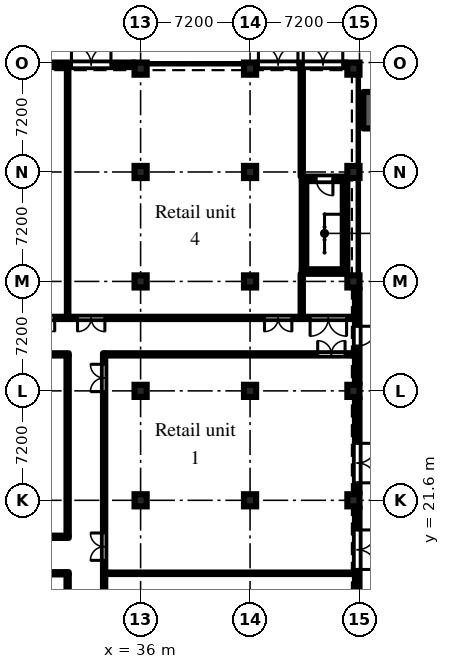
"""IFC4 building model, lengths in metres.
Left out: names, types, materials, properties, quantities, classifications, styles, units other than length and angle.
Written with IfcOpenShell. Run it as: python <this file> out.ifc"""

import sys

from ifc_helpers import new_model, si_unit, direction, frame, frame_2d, origin, origin_2d, place, context, subcontext, project, spatial, rectangle, extrude, element, fill, save


model = new_model("IFC4")
c1 = context("Model", 3, precision=1e-05, world=origin(), true_north=direction((0.0, 1.0)))
c2 = subcontext(c1, "Body", "Model", "MODEL_VIEW")
j1 = project(units=[si_unit("LENGTHUNIT", "METRE"), si_unit("PLANEANGLEUNIT", "RADIAN")], contexts=[c1])
p1 = place(None, origin())
s1 = spatial("IfcSite", under=j1, at=p1, CompositionType="ELEMENT")
p2 = place(p1, origin())
s2 = spatial("IfcBuilding", under=s1, at=p2, CompositionType="ELEMENT")
p3 = place(p2, origin())
s3 = spatial("IfcBuildingStorey", under=s2, at=p3, CompositionType="ELEMENT", Elevation=0.0)
for number, where, z_axis, x_axis in (
    (1, (36.0, 21.6, 0.0), (0.0, 0.0, 1.0), (1.0, 0.0, 0.0)),
    (2, (36.0, 28.8, 0.0), (0.0, 0.0, 1.0), (1.0, 0.0, 0.0)),
    (3, (36.0, 36.0, 0.0), (0.0, 0.0, 1.0), (1.0, 0.0, 0.0)),
    (4, (36.0, 43.2, 0.0), (0.0, 0.0, 1.0), (1.0, 0.0, 0.0)),
    (5, (36.0, 50.0, 0.0), (0.0, 0.0, 1.0), (1.0, 0.0, 0.0)),
    (6, (43.2, 21.6, 0.0), (0.0, 0.0, 1.0), (1.0, 0.0, 0.0)),
    (7, (43.2, 28.8, 0.0), (0.0, 0.0, 1.0), (1.0, 0.0, 0.0)),
    (8, (43.2, 36.0, 0.0), (0.0, 0.0, 1.0), (1.0, 0.0, 0.0)),
    (9, (43.2, 43.2, 0.0), (0.0, 0.0, 1.0), (1.0, 0.0, 0.0)),
    (10, (43.2, 50.0, 0.0), (0.0, 0.0, 1.0), (1.0, 0.0, 0.0)),
    (11, (50.0, 21.6, 0.0), (0.0, 0.0, 1.0), (1.0, 0.0, 0.0)),
    (12, (50.0, 28.8, 0.0), (0.0, 0.0, 1.0), (1.0, 0.0, 0.0)),
    (13, (50.0, 36.0, 0.0), (0.0, 0.0, 1.0), (1.0, 0.0, 0.0)),
    (14, (50.0, 43.2, 0.0), (0.0, 0.0, 1.0), (1.0, 0.0, 0.0)),
    (15, (50.0, 50.0, 0.0), (0.0, 0.0, 1.0), (1.0, 0.0, 0.0)),
):
    element("IfcColumn", number, at=place(p3, frame(where, z_axis=z_axis, x_axis=x_axis)), inside=s3, PredefinedType="COLUMN", context=c2, shape_type="SweptSolid", body=[
        extrude(rectangle(XDim=0.8, YDim=0.8, at=origin_2d()), origin(), (0.0, 0.0, 1.0), 6.6),
    ])
p4 = place(p3, frame((50.25, 14.8, 0.0), z_axis=(0.0, 0.0, 1.0), x_axis=(0.0, 1.0, 0.0)))
e16 = element("IfcWall", 16, at=p4, inside=s3, PredefinedType="SOLIDWALL", context=c2, shape_type="SweptSolid", body=[
    extrude(rectangle(XDim=6.4, YDim=0.3, at=frame_2d((3.2, 0.0))), origin(), (0.0, 0.0, 1.0), 6.6),
])
p5 = place(p4, frame((2.25, 0.0, 0.0)))
e17 = element("IfcOpeningElement", 17, at=p5, cuts=e16, PredefinedType="OPENING", context=c2, shape_type="SweptSolid", body=[
    extrude(rectangle(XDim=2.6, YDim=2.4, at=frame_2d((1.3, 1.2))), frame((0.0, 0.16, 0.0), z_axis=(0.0, -1.0, 0.0), x_axis=(1.0, 0.0, 0.0)), (0.0, 0.0, 1.0), 0.32),
])
p6 = place(p3, frame((50.25, 22.0, 0.0), z_axis=(0.0, 0.0, 1.0), x_axis=(0.0, 1.0, 0.0)))
e18 = element("IfcWall", 18, at=p6, inside=s3, PredefinedType="SOLIDWALL", context=c2, shape_type="SweptSolid", body=[
    extrude(rectangle(XDim=6.4, YDim=0.3, at=frame_2d((3.2, 0.0))), origin(), (0.0, 0.0, 1.0), 6.6),
])
p7 = place(p6, frame((0.75, 0.0, 0.0)))
e19 = element("IfcOpeningElement", 19, at=p7, cuts=e18, PredefinedType="OPENING", context=c2, shape_type="SweptSolid", body=[
    extrude(rectangle(XDim=2.6, YDim=2.4, at=frame_2d((1.3, 1.2))), frame((0.0, 0.16, 0.0), z_axis=(0.0, -1.0, 0.0), x_axis=(1.0, 0.0, 0.0)), (0.0, 0.0, 1.0), 0.32),
])
p8 = place(p3, frame((50.25, 29.2, 0.0), z_axis=(0.0, 0.0, 1.0), x_axis=(0.0, 1.0, 0.0)))
e20 = element("IfcWall", 20, at=p8, inside=s3, PredefinedType="SOLIDWALL", context=c2, shape_type="SweptSolid", body=[
    extrude(rectangle(XDim=6.4, YDim=0.3, at=frame_2d((3.2, 0.0))), origin(), (0.0, 0.0, 1.0), 6.6),
])
p9 = place(p8, frame((2.55, 0.0, 0.0)))
e21 = element("IfcOpeningElement", 21, at=p9, cuts=e20, PredefinedType="OPENING", context=c2, shape_type="SweptSolid", body=[
    extrude(rectangle(XDim=1.3, YDim=2.1, at=frame_2d((0.65, 1.05))), frame((0.0, 0.16, 0.0), z_axis=(0.0, -1.0, 0.0), x_axis=(1.0, 0.0, 0.0)), (0.0, 0.0, 1.0), 0.32),
])
p10 = place(p3, frame((49.6, 50.25, 0.0), z_axis=(0.0, 0.0, 1.0), x_axis=(-1.0, 0.0, 0.0)))
e22 = element("IfcWall", 22, at=p10, inside=s3, PredefinedType="SOLIDWALL", context=c2, shape_type="SweptSolid", body=[
    extrude(rectangle(XDim=6.0, YDim=0.3, at=frame_2d((3.0, 0.0))), origin(), (0.0, 0.0, 1.0), 6.6),
])
p11 = place(p10, frame((0.3, 0.0, 0.0)))
e23 = element("IfcOpeningElement", 23, at=p11, cuts=e22, PredefinedType="OPENING", context=c2, shape_type="SweptSolid", body=[
    extrude(rectangle(XDim=2.6, YDim=2.4, at=frame_2d((1.3, 1.2))), frame((0.0, 0.16, 0.0), z_axis=(0.0, -1.0, 0.0), x_axis=(1.0, 0.0, 0.0)), (0.0, 0.0, 1.0), 0.32),
])
p12 = place(p10, frame((3.25, 0.0, 0.0)))
e24 = element("IfcOpeningElement", 24, at=p12, cuts=e22, PredefinedType="OPENING", context=c2, shape_type="SweptSolid", body=[
    extrude(rectangle(XDim=2.6, YDim=2.4, at=frame_2d((1.3, 1.2))), frame((0.0, 0.16, 0.0), z_axis=(0.0, -1.0, 0.0), x_axis=(1.0, 0.0, 0.0)), (0.0, 0.0, 1.0), 0.32),
])
p13 = place(p3, frame((35.6, 50.25, 0.0), z_axis=(0.0, 0.0, 1.0), x_axis=(-1.0, 0.0, 0.0)))
e25 = element("IfcWall", 25, at=p13, inside=s3, PredefinedType="SOLIDWALL", context=c2, shape_type="SweptSolid", body=[
    extrude(rectangle(XDim=6.4, YDim=0.3, at=frame_2d((3.2, 0.0))), origin(), (0.0, 0.0, 1.0), 6.6),
])
p14 = place(p13, frame((1.55, 0.0, 0.0)))
e26 = element("IfcOpeningElement", 26, at=p14, cuts=e25, PredefinedType="OPENING", context=c2, shape_type="SweptSolid", body=[
    extrude(rectangle(XDim=2.6, YDim=2.4, at=frame_2d((1.3, 1.2))), frame((0.0, 0.16, 0.0), z_axis=(0.0, -1.0, 0.0), x_axis=(1.0, 0.0, 0.0)), (0.0, 0.0, 1.0), 0.32),
])
p15 = place(p3, frame((51.05, 46.064, 0.0), z_axis=(0.0, 0.0, 1.0), x_axis=(0.0, 1.0, 0.0)))
e27 = element("IfcWall", 27, at=p15, inside=s3, PredefinedType="SOLIDWALL", context=c2, shape_type="SweptSolid", body=[
    extrude(rectangle(XDim=2.4, YDim=0.8, at=frame_2d((1.2, 0.0))), origin(), (0.0, 0.0, 1.0), 6.6),
])
p16 = place(p3, frame((46.6, 36.65, 0.0), z_axis=(0.0, 0.0, 1.0), x_axis=(1.0, 0.0, 0.0)))
e28 = element("IfcWall", 28, at=p16, inside=s3, PredefinedType="SHEAR", context=c2, shape_type="SweptSolid", body=[
    extrude(rectangle(XDim=3.0, YDim=0.3, at=frame_2d((1.5, 0.0))), origin(), (0.0, 0.0, 1.0), 6.6),
])
p17 = place(p3, frame((46.6, 42.75, 0.0), z_axis=(0.0, 0.0, 1.0), x_axis=(1.0, 0.0, 0.0)))
e29 = element("IfcWall", 29, at=p17, inside=s3, PredefinedType="SHEAR", context=c2, shape_type="SweptSolid", body=[
    extrude(rectangle(XDim=3.0, YDim=0.3, at=frame_2d((1.5, 0.0))), origin(), (0.0, 0.0, 1.0), 6.6),
])
p18 = place(p17, frame((0.95, 0.0, 0.0)))
e30 = element("IfcOpeningElement", 30, at=p18, cuts=e29, PredefinedType="OPENING", context=c2, shape_type="SweptSolid", body=[
    extrude(rectangle(XDim=1.1, YDim=2.1, at=frame_2d((0.55, 1.05))), frame((0.0, 0.16, 0.0), z_axis=(0.0, -1.0, 0.0), x_axis=(1.0, 0.0, 0.0)), (0.0, 0.0, 1.0), 0.32),
])
for number, where, z_axis, x_axis in (
    (31, (46.75, 36.8, 0.0), (0.0, 0.0, 1.0), (0.0, 1.0, 0.0)),
    (32, (49.45, 36.8, 0.0), (0.0, 0.0, 1.0), (0.0, 1.0, 0.0)),
):
    element("IfcWall", number, at=place(p3, frame(where, z_axis=z_axis, x_axis=x_axis)), inside=s3, PredefinedType="SHEAR", context=c2, shape_type="SweptSolid", body=[
        extrude(rectangle(XDim=5.8, YDim=0.3, at=frame_2d((2.9, 0.0))), origin(), (0.0, 0.0, 1.0), 6.6),
    ])
p19 = place(p3, frame((18.675, 16.8, 0.0), z_axis=(0.0, 0.0, 1.0), x_axis=(1.0, 0.0, 0.0)))
e33 = element("IfcWall", 33, at=p19, inside=s3, PredefinedType="PARTITIONING", context=c2, shape_type="SweptSolid", body=[
    extrude(rectangle(XDim=12.6, YDim=0.15, at=frame_2d((6.3, 0.0))), origin(), (0.0, 0.0, 1.0), 6.6),
])
p20 = place(p3, frame((18.675, 19.2, 0.0), z_axis=(0.0, 0.0, 1.0), x_axis=(1.0, 0.0, 0.0)))
e34 = element("IfcWall", 34, at=p20, inside=s3, PredefinedType="PARTITIONING", context=c2, shape_type="SweptSolid", body=[
    extrude(rectangle(XDim=12.6, YDim=0.15, at=frame_2d((6.3, 0.0))), origin(), (0.0, 0.0, 1.0), 6.6),
])
p21 = place(p20, frame((1.175, 0.0, 0.0)))
e35 = element("IfcOpeningElement", 35, at=p21, cuts=e34, PredefinedType="OPENING", context=c2, shape_type="SweptSolid", body=[
    extrude(rectangle(XDim=1.2, YDim=2.1, at=frame_2d((0.6, 1.05))), frame((0.0, 0.085, 0.0), z_axis=(0.0, -1.0, 0.0), x_axis=(1.0, 0.0, 0.0)), (0.0, 0.0, 1.0), 0.17),
])
p22 = place(p20, frame((9.78, 0.0, 0.0)))
e36 = element("IfcOpeningElement", 36, at=p22, cuts=e34, PredefinedType="OPENING", context=c2, shape_type="SweptSolid", body=[
    extrude(rectangle(XDim=1.2, YDim=2.1, at=frame_2d((0.6, 1.05))), frame((0.0, 0.085, 0.0), z_axis=(0.0, -1.0, 0.0), x_axis=(1.0, 0.0, 0.0)), (0.0, 0.0, 1.0), 0.17),
])
p23 = place(p3, frame((18.675, 31.2, 0.0), z_axis=(0.0, 0.0, 1.0), x_axis=(1.0, 0.0, 0.0)))
e37 = element("IfcWall", 37, at=p23, inside=s3, PredefinedType="PARTITIONING", context=c2, shape_type="SweptSolid", body=[
    extrude(rectangle(XDim=12.6, YDim=0.15, at=frame_2d((6.3, 0.0))), origin(), (0.0, 0.0, 1.0), 6.6),
])
p24 = place(p23, frame((3.68, 0.0, 0.0)))
e38 = element("IfcOpeningElement", 38, at=p24, cuts=e37, PredefinedType="OPENING", context=c2, shape_type="SweptSolid", body=[
    extrude(rectangle(XDim=1.2, YDim=2.1, at=frame_2d((0.6, 1.05))), frame((0.0, 0.085, 0.0), z_axis=(0.0, -1.0, 0.0), x_axis=(1.0, 0.0, 0.0)), (0.0, 0.0, 1.0), 0.17),
])
p25 = place(p23, frame((7.675, 0.0, 0.0)))
e39 = element("IfcOpeningElement", 39, at=p25, cuts=e37, PredefinedType="OPENING", context=c2, shape_type="SweptSolid", body=[
    extrude(rectangle(XDim=1.2, YDim=2.1, at=frame_2d((0.6, 1.05))), frame((0.0, 0.085, 0.0), z_axis=(0.0, -1.0, 0.0), x_axis=(1.0, 0.0, 0.0)), (0.0, 0.0, 1.0), 0.17),
])
p26 = place(p3, frame((18.675, 33.6, 0.0), z_axis=(0.0, 0.0, 1.0), x_axis=(1.0, 0.0, 0.0)))
e40 = element("IfcWall", 40, at=p26, inside=s3, PredefinedType="PARTITIONING", context=c2, shape_type="SweptSolid", body=[
    extrude(rectangle(XDim=31.545, YDim=0.15, at=frame_2d((15.772, 0.0))), origin(), (0.0, 0.0, 1.0), 6.6),
])
p27 = place(p26, frame((28.475, 0.0, 0.0)))
e41 = element("IfcOpeningElement", 41, at=p27, cuts=e40, PredefinedType="OPENING", context=c2, shape_type="SweptSolid", body=[
    extrude(rectangle(XDim=2.4, YDim=2.1, at=frame_2d((1.2, 1.05))), frame((0.0, 0.085, 0.0), z_axis=(0.0, -1.0, 0.0), x_axis=(1.0, 0.0, 0.0)), (0.0, 0.0, 1.0), 0.17),
])
p28 = place(p26, frame((0.575, 0.0, 0.0)))
e42 = element("IfcOpeningElement", 42, at=p28, cuts=e40, PredefinedType="OPENING", context=c2, shape_type="SweptSolid", body=[
    extrude(rectangle(XDim=1.8, YDim=2.1, at=frame_2d((0.9, 1.05))), frame((0.0, 0.085, 0.0), z_axis=(0.0, -1.0, 0.0), x_axis=(1.0, 0.0, 0.0)), (0.0, 0.0, 1.0), 0.17),
])
p29 = place(p26, frame((9.875, 0.0, 0.0)))
e43 = element("IfcOpeningElement", 43, at=p29, cuts=e40, PredefinedType="OPENING", context=c2, shape_type="SweptSolid", body=[
    extrude(rectangle(XDim=1.8, YDim=2.1, at=frame_2d((0.9, 1.05))), frame((0.0, 0.085, 0.0), z_axis=(0.0, -1.0, 0.0), x_axis=(1.0, 0.0, 0.0)), (0.0, 0.0, 1.0), 0.17),
])
p30 = place(p26, frame((13.175, 0.0, 0.0)))
e44 = element("IfcOpeningElement", 44, at=p30, cuts=e40, PredefinedType="OPENING", context=c2, shape_type="SweptSolid", body=[
    extrude(rectangle(XDim=1.8, YDim=2.1, at=frame_2d((0.9, 1.05))), frame((0.0, 0.085, 0.0), z_axis=(0.0, -1.0, 0.0), x_axis=(1.0, 0.0, 0.0)), (0.0, 0.0, 1.0), 0.17),
])
p31 = place(p26, frame((25.475, 0.0, 0.0)))
e45 = element("IfcOpeningElement", 45, at=p31, cuts=e40, PredefinedType="OPENING", context=c2, shape_type="SweptSolid", body=[
    extrude(rectangle(XDim=1.8, YDim=2.1, at=frame_2d((0.9, 1.05))), frame((0.0, 0.085, 0.0), z_axis=(0.0, -1.0, 0.0), x_axis=(1.0, 0.0, 0.0)), (0.0, 0.0, 1.0), 0.17),
])
p32 = place(p3, frame((31.2, 10.325, 0.0), z_axis=(0.0, 0.0, 1.0), x_axis=(0.0, 1.0, 0.0)))
e46 = element("IfcWall", 46, at=p32, inside=s3, PredefinedType="PARTITIONING", context=c2, shape_type="SweptSolid", body=[
    extrude(rectangle(XDim=6.4, YDim=0.15, at=frame_2d((3.2, 0.0))), origin(), (0.0, 0.0, 1.0), 6.6),
])
p33 = place(p32, frame((3.425, 0.0, 0.0)))
e47 = element("IfcOpeningElement", 47, at=p33, cuts=e46, PredefinedType="OPENING", context=c2, shape_type="SweptSolid", body=[
    extrude(rectangle(XDim=1.8, YDim=2.1, at=frame_2d((0.9, 1.05))), frame((0.0, 0.085, 0.0), z_axis=(0.0, -1.0, 0.0), x_axis=(1.0, 0.0, 0.0)), (0.0, 0.0, 1.0), 0.17),
])
p34 = place(p3, frame((31.2, 19.275, 0.0), z_axis=(0.0, 0.0, 1.0), x_axis=(0.0, 1.0, 0.0)))
e48 = element("IfcWall", 48, at=p34, inside=s3, PredefinedType="PARTITIONING", context=c2, shape_type="SweptSolid", body=[
    extrude(rectangle(XDim=11.85, YDim=0.15, at=frame_2d((5.925, 0.0))), origin(), (0.0, 0.0, 1.0), 6.6),
])
p35 = place(p3, frame((31.2, 33.675, 0.0), z_axis=(0.0, 0.0, 1.0), x_axis=(0.0, 1.0, 0.0)))
e49 = element("IfcWall", 49, at=p35, inside=s3, PredefinedType="PARTITIONING", context=c2, shape_type="SweptSolid", body=[
    extrude(rectangle(XDim=16.545, YDim=0.1, at=frame_2d((8.272, 0.0))), origin(), (0.0, 0.0, 1.0), 6.6),
])
p36 = place(p3, frame((33.6, 10.325, 0.0), z_axis=(0.0, 0.0, 1.0), x_axis=(0.0, 1.0, 0.0)))
e50 = element("IfcWall", 50, at=p36, inside=s3, PredefinedType="PARTITIONING", context=c2, shape_type="SweptSolid", body=[
    extrude(rectangle(XDim=20.95, YDim=0.15, at=frame_2d((10.475, 0.0))), origin(), (0.0, 0.0, 1.0), 6.6),
])
p37 = place(p36, frame((1.175, 0.0, 0.0)))
e51 = element("IfcOpeningElement", 51, at=p37, cuts=e50, PredefinedType="OPENING", context=c2, shape_type="SweptSolid", body=[
    extrude(rectangle(XDim=1.8, YDim=2.1, at=frame_2d((0.9, 1.05))), frame((0.0, 0.085, 0.0), z_axis=(0.0, -1.0, 0.0), x_axis=(1.0, 0.0, 0.0)), (0.0, 0.0, 1.0), 0.17),
])
p38 = place(p36, frame((7.325, 0.0, 0.0)))
e52 = element("IfcOpeningElement", 52, at=p38, cuts=e50, PredefinedType="OPENING", context=c2, shape_type="SweptSolid", body=[
    extrude(rectangle(XDim=1.8, YDim=2.1, at=frame_2d((0.9, 1.05))), frame((0.0, 0.085, 0.0), z_axis=(0.0, -1.0, 0.0), x_axis=(1.0, 0.0, 0.0)), (0.0, 0.0, 1.0), 0.17),
])
p39 = place(p36, frame((18.425, 0.0, 0.0)))
e53 = element("IfcOpeningElement", 53, at=p39, cuts=e50, PredefinedType="OPENING", context=c2, shape_type="SweptSolid", body=[
    extrude(rectangle(XDim=1.8, YDim=2.1, at=frame_2d((0.9, 1.05))), frame((0.0, 0.085, 0.0), z_axis=(0.0, -1.0, 0.0), x_axis=(1.0, 0.0, 0.0)), (0.0, 0.0, 1.0), 0.17),
])
p40 = place(p3, frame((33.675, 16.8, 0.0), z_axis=(0.0, 0.0, 1.0), x_axis=(1.0, 0.0, 0.0)))
e54 = element("IfcWall", 54, at=p40, inside=s3, PredefinedType="PARTITIONING", context=c2, shape_type="SweptSolid", body=[
    extrude(rectangle(XDim=16.545, YDim=0.1, at=frame_2d((8.272, 0.0))), origin(), (0.0, 0.0, 1.0), 6.6),
])
p41 = place(p3, frame((33.675, 31.2, 0.0), z_axis=(0.0, 0.0, 1.0), x_axis=(1.0, 0.0, 0.0)))
e55 = element("IfcWall", 55, at=p41, inside=s3, PredefinedType="PARTITIONING", context=c2, shape_type="SweptSolid", body=[
    extrude(rectangle(XDim=16.545, YDim=0.15, at=frame_2d((8.272, 0.0))), origin(), (0.0, 0.0, 1.0), 6.6),
])
p42 = place(p41, frame((13.975, 0.0, 0.0)))
e56 = element("IfcOpeningElement", 56, at=p42, cuts=e55, PredefinedType="OPENING", context=c2, shape_type="SweptSolid", body=[
    extrude(rectangle(XDim=1.8, YDim=2.1, at=frame_2d((0.9, 1.05))), frame((0.0, 0.085, 0.0), z_axis=(0.0, -1.0, 0.0), x_axis=(1.0, 0.0, 0.0)), (0.0, 0.0, 1.0), 0.17),
])
p43 = place(p3, frame((46.6, 33.675, 0.0), z_axis=(0.0, 0.0, 1.0), x_axis=(0.0, 1.0, 0.0)))
e57 = element("IfcWall", 57, at=p43, inside=s3, PredefinedType="PARTITIONING", context=c2, shape_type="SweptSolid", body=[
    extrude(rectangle(XDim=2.825, YDim=0.15, at=frame_2d((1.413, 0.0))), origin(), (0.0, 0.0, 1.0), 6.6),
])
p44 = place(p3, frame((46.6, 42.9, 0.0), z_axis=(0.0, 0.0, 1.0), x_axis=(0.0, 1.0, 0.0)))
e58 = element("IfcWall", 58, at=p44, inside=s3, PredefinedType="PARTITIONING", context=c2, shape_type="SweptSolid", body=[
    extrude(rectangle(XDim=7.32, YDim=0.15, at=frame_2d((3.66, 0.0))), origin(), (0.0, 0.0, 1.0), 6.6),
])
p45 = place(p5, frame((2.6, 0.0, 0.0), z_axis=(0.0, 0.0, 1.0), x_axis=(-1.0, 0.0, 0.0)))
e59 = element("IfcDoor", 59, at=p45, inside=s3, OperationType="DOUBLE_DOOR_DOUBLE_SWING", PredefinedType="DOOR", context=c2, shape_type="SweptSolid", body=[
    extrude(rectangle(XDim=2.6, YDim=2.4, at=frame_2d((1.3, 1.2))), frame((0.0, 0.025, 0.0), z_axis=(0.0, -1.0, 0.0), x_axis=(1.0, 0.0, 0.0)), (0.0, 0.0, 1.0), 0.05),
])
fill(e17, e59)
p46 = place(p7, frame((2.6, 0.0, 0.0), z_axis=(0.0, 0.0, 1.0), x_axis=(-1.0, 0.0, 0.0)))
e60 = element("IfcDoor", 60, at=p46, inside=s3, OperationType="DOUBLE_DOOR_DOUBLE_SWING", PredefinedType="DOOR", context=c2, shape_type="SweptSolid", body=[
    extrude(rectangle(XDim=2.6, YDim=2.4, at=frame_2d((1.3, 1.2))), frame((0.0, 0.025, 0.0), z_axis=(0.0, -1.0, 0.0), x_axis=(1.0, 0.0, 0.0)), (0.0, 0.0, 1.0), 0.05),
])
fill(e19, e60)
p47 = place(p9, frame((1.3, 0.0, 0.0), z_axis=(0.0, 0.0, 1.0), x_axis=(-1.0, 0.0, 0.0)))
e61 = element("IfcDoor", 61, at=p47, inside=s3, OperationType="SINGLE_SWING_LEFT", PredefinedType="DOOR", context=c2, shape_type="SweptSolid", body=[
    extrude(rectangle(XDim=1.3, YDim=2.1, at=frame_2d((0.65, 1.05))), frame((0.0, 0.025, 0.0), z_axis=(0.0, -1.0, 0.0), x_axis=(1.0, 0.0, 0.0)), (0.0, 0.0, 1.0), 0.05),
])
fill(e21, e61)
p48 = place(p11, frame((2.6, 0.0, 0.0), z_axis=(0.0, 0.0, 1.0), x_axis=(-1.0, 0.0, 0.0)))
e62 = element("IfcDoor", 62, at=p48, inside=s3, OperationType="DOUBLE_DOOR_DOUBLE_SWING", PredefinedType="DOOR", context=c2, shape_type="SweptSolid", body=[
    extrude(rectangle(XDim=2.6, YDim=2.4, at=frame_2d((1.3, 1.2))), frame((0.0, 0.025, 0.0), z_axis=(0.0, -1.0, 0.0), x_axis=(1.0, 0.0, 0.0)), (0.0, 0.0, 1.0), 0.05),
])
fill(e23, e62)
p49 = place(p12, frame((2.6, 0.0, 0.0), z_axis=(0.0, 0.0, 1.0), x_axis=(-1.0, 0.0, 0.0)))
e63 = element("IfcDoor", 63, at=p49, inside=s3, OperationType="DOUBLE_DOOR_DOUBLE_SWING", PredefinedType="DOOR", context=c2, shape_type="SweptSolid", body=[
    extrude(rectangle(XDim=2.6, YDim=2.4, at=frame_2d((1.3, 1.2))), frame((0.0, 0.025, 0.0), z_axis=(0.0, -1.0, 0.0), x_axis=(1.0, 0.0, 0.0)), (0.0, 0.0, 1.0), 0.05),
])
fill(e24, e63)
p50 = place(p14, frame((2.6, 0.0, 0.0), z_axis=(0.0, 0.0, 1.0), x_axis=(-1.0, 0.0, 0.0)))
e64 = element("IfcDoor", 64, at=p50, inside=s3, OperationType="DOUBLE_DOOR_DOUBLE_SWING", PredefinedType="DOOR", context=c2, shape_type="SweptSolid", body=[
    extrude(rectangle(XDim=2.6, YDim=2.4, at=frame_2d((1.3, 1.2))), frame((0.0, 0.025, 0.0), z_axis=(0.0, -1.0, 0.0), x_axis=(1.0, 0.0, 0.0)), (0.0, 0.0, 1.0), 0.05),
])
fill(e26, e64)
p51 = place(p18, frame((1.1, 0.0, 0.0), z_axis=(0.0, 0.0, 1.0), x_axis=(-1.0, 0.0, 0.0)))
e65 = element("IfcDoor", 65, at=p51, inside=s3, OperationType="SINGLE_SWING_LEFT", PredefinedType="DOOR", context=c2, shape_type="SweptSolid", body=[
    extrude(rectangle(XDim=1.1, YDim=2.1, at=frame_2d((0.55, 1.05))), frame((0.0, 0.025, 0.0), z_axis=(0.0, -1.0, 0.0), x_axis=(1.0, 0.0, 0.0)), (0.0, 0.0, 1.0), 0.05),
])
fill(e30, e65)
p52 = place(p27, frame((2.4, 0.0, 0.0), z_axis=(0.0, 0.0, 1.0), x_axis=(-1.0, 0.0, 0.0)))
e66 = element("IfcDoor", 66, at=p52, inside=s3, OperationType="DOUBLE_DOOR_DOUBLE_SWING", PredefinedType="DOOR", context=c2, shape_type="SweptSolid", body=[
    extrude(rectangle(XDim=2.4, YDim=2.1, at=frame_2d((1.2, 1.05))), frame((0.0, 0.025, 0.0), z_axis=(0.0, -1.0, 0.0), x_axis=(1.0, 0.0, 0.0)), (0.0, 0.0, 1.0), 0.05),
])
fill(e41, e66)
p53 = place(p38, origin())
e67 = element("IfcDoor", 67, at=p53, inside=s3, OperationType="DOUBLE_DOOR_DOUBLE_SWING", PredefinedType="DOOR", context=c2, shape_type="SweptSolid", body=[
    extrude(rectangle(XDim=1.8, YDim=2.1, at=frame_2d((0.9, 1.05))), frame((0.0, 0.025, 0.0), z_axis=(0.0, -1.0, 0.0), x_axis=(1.0, 0.0, 0.0)), (0.0, 0.0, 1.0), 0.05),
])
fill(e52, e67)
p54 = place(p39, origin())
e68 = element("IfcDoor", 68, at=p54, inside=s3, OperationType="DOUBLE_DOOR_DOUBLE_SWING", PredefinedType="DOOR", context=c2, shape_type="SweptSolid", body=[
    extrude(rectangle(XDim=1.8, YDim=2.1, at=frame_2d((0.9, 1.05))), frame((0.0, 0.025, 0.0), z_axis=(0.0, -1.0, 0.0), x_axis=(1.0, 0.0, 0.0)), (0.0, 0.0, 1.0), 0.05),
])
fill(e53, e68)
p55 = place(p42, origin())
e69 = element("IfcDoor", 69, at=p55, inside=s3, OperationType="DOUBLE_DOOR_DOUBLE_SWING", PredefinedType="DOOR", context=c2, shape_type="SweptSolid", body=[
    extrude(rectangle(XDim=1.8, YDim=2.1, at=frame_2d((0.9, 1.05))), frame((0.0, 0.025, 0.0), z_axis=(0.0, -1.0, 0.0), x_axis=(1.0, 0.0, 0.0)), (0.0, 0.0, 1.0), 0.05),
])
fill(e56, e69)
p56 = place(p29, frame((1.8, 0.0, 0.0), z_axis=(0.0, 0.0, 1.0), x_axis=(-1.0, 0.0, 0.0)))
e70 = element("IfcDoor", 70, at=p56, inside=s3, OperationType="DOUBLE_DOOR_DOUBLE_SWING", PredefinedType="DOOR", context=c2, shape_type="SweptSolid", body=[
    extrude(rectangle(XDim=1.8, YDim=2.1, at=frame_2d((0.9, 1.05))), frame((0.0, 0.025, 0.0), z_axis=(0.0, -1.0, 0.0), x_axis=(1.0, 0.0, 0.0)), (0.0, 0.0, 1.0), 0.05),
])
fill(e43, e70)
p57 = place(p30, frame((1.8, 0.0, 0.0), z_axis=(0.0, 0.0, 1.0), x_axis=(-1.0, 0.0, 0.0)))
e71 = element("IfcDoor", 71, at=p57, inside=s3, OperationType="DOUBLE_DOOR_DOUBLE_SWING", PredefinedType="DOOR", context=c2, shape_type="SweptSolid", body=[
    extrude(rectangle(XDim=1.8, YDim=2.1, at=frame_2d((0.9, 1.05))), frame((0.0, 0.025, 0.0), z_axis=(0.0, -1.0, 0.0), x_axis=(1.0, 0.0, 0.0)), (0.0, 0.0, 1.0), 0.05),
])
fill(e44, e71)
p58 = place(p31, frame((1.8, 0.0, 0.0), z_axis=(0.0, 0.0, 1.0), x_axis=(-1.0, 0.0, 0.0)))
e72 = element("IfcDoor", 72, at=p58, inside=s3, OperationType="DOUBLE_DOOR_DOUBLE_SWING", PredefinedType="DOOR", context=c2, shape_type="SweptSolid", body=[
    extrude(rectangle(XDim=1.8, YDim=2.1, at=frame_2d((0.9, 1.05))), frame((0.0, 0.025, 0.0), z_axis=(0.0, -1.0, 0.0), x_axis=(1.0, 0.0, 0.0)), (0.0, 0.0, 1.0), 0.05),
])
fill(e45, e72)
save(model, sys.argv[1])
